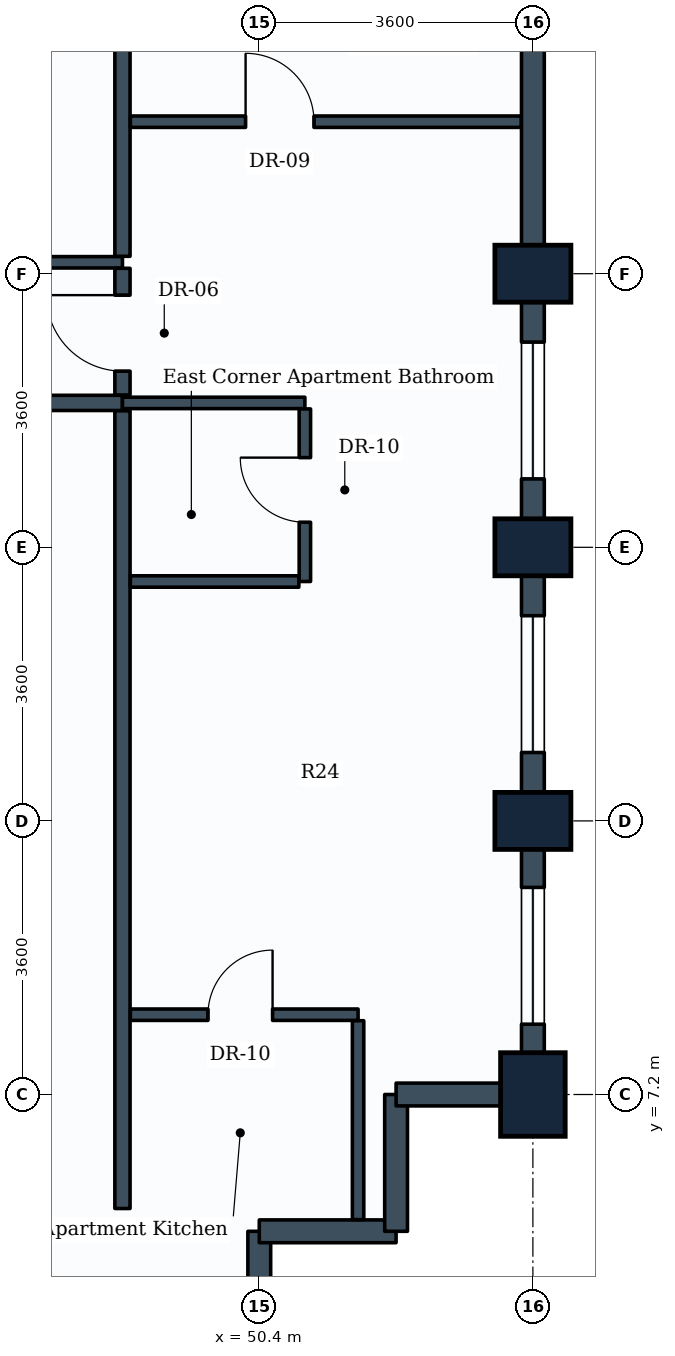
"""IFC4 building model, lengths in metres.
Left out: names, types, materials, properties, quantities, classifications, styles, units other than length and angle.
Written with IfcOpenShell. Run it as: python <this file> out.ifc"""

import sys

from ifc_helpers import new_model, si_unit, direction, frame, frame_2d, origin, origin_2d, place, context, subcontext, project, spatial, rectangle, extrude, element, fill, save


model = new_model("IFC4")
c1 = context("Model", 3, precision=1e-05, world=origin(), true_north=direction((0.0, 1.0)))
c2 = subcontext(c1, "Body", "Model", "MODEL_VIEW")
j1 = project(units=[si_unit("LENGTHUNIT", "METRE"), si_unit("PLANEANGLEUNIT", "RADIAN")], contexts=[c1])
p1 = place(None, origin())
s1 = spatial("IfcSite", under=j1, at=p1, CompositionType="ELEMENT")
p2 = place(p1, origin())
s2 = spatial("IfcBuilding", under=s1, at=p2, CompositionType="ELEMENT")
p3 = place(p2, frame((0.0, 0.0, 135.2)))
s3 = spatial("IfcBuildingStorey", under=s2, at=p3, CompositionType="ELEMENT", Elevation=135.2)
p4 = place(p3, frame((54.0, 7.2, 0.0), z_axis=(0.0, 0.0, 1.0), x_axis=(1.0, 0.0, 0.0)))
e1 = element("IfcColumn", 1, at=p4, inside=s3, PredefinedType="COLUMN", context=c2, shape_type="SweptSolid", body=[
    extrude(rectangle(XDim=0.85, YDim=1.1, at=origin_2d()), origin(), (0.0, 0.0, 1.0), 3.8),
])
for number, where, z_axis, x_axis in (
    (2, (54.0, 10.8, 0.0), (0.0, 0.0, 1.0), (0.0, 1.0, 0.0)),
    (3, (54.0, 14.4, 0.0), (0.0, 0.0, 1.0), (0.0, 1.0, 0.0)),
    (4, (54.0, 18.0, 0.0), (0.0, 0.0, 1.0), (0.0, 1.0, 0.0)),
):
    element("IfcColumn", number, at=place(p3, frame(where, z_axis=z_axis, x_axis=x_axis)), inside=s3, PredefinedType="COLUMN", context=c2, shape_type="SweptSolid", body=[
        extrude(rectangle(XDim=0.75, YDim=1.0, at=origin_2d()), origin(), (0.0, 0.0, 1.0), 3.8),
    ])
p5 = place(p3, frame((50.4, 5.4, 0.0), z_axis=(0.0, 0.0, 1.0), x_axis=(0.0, -1.0, 0.0)))
e5 = element("IfcWall", 5, at=p5, inside=s3, PredefinedType="STANDARD", context=c2, shape_type="SweptSolid", body=[
    extrude(rectangle(XDim=1.8, YDim=0.3, at=frame_2d((0.9, 0.0))), origin(), (0.0, 0.0, 1.0), 2.93),
])
for number, where, z_axis, x_axis in (
    (6, (52.2, 5.4, 0.0), (0.0, 0.0, 1.0), (-1.0, 0.0, 0.0)),
    (7, (52.2, 7.2, 0.0), (0.0, 0.0, 1.0), (0.0, -1.0, 0.0)),
):
    element("IfcWall", number, at=place(p3, frame(where, z_axis=z_axis, x_axis=x_axis)), inside=s3, PredefinedType="STANDARD", context=c2, shape_type="SweptSolid", body=[
        extrude(rectangle(XDim=1.8, YDim=0.3, at=frame_2d((0.9, 0.0))), origin(), (0.0, 0.0, 1.0), 3.535),
    ])
p6 = place(p3, frame((54.0, 7.2, 0.0), z_axis=(0.0, 0.0, 1.0), x_axis=(-1.0, 0.0, 0.0)))
e8 = element("IfcWall", 8, at=p6, inside=s3, PredefinedType="STANDARD", context=c2, shape_type="SweptSolid", body=[
    extrude(rectangle(XDim=1.8, YDim=0.3, at=frame_2d((0.9, 0.0))), origin(), (0.0, 0.0, 1.0), 2.93),
])
p7 = place(p3, frame((54.0, 10.8, 0.0), z_axis=(0.0, 0.0, 1.0), x_axis=(0.0, -1.0, 0.0)))
e9 = element("IfcWall", 9, at=p7, inside=s3, PredefinedType="STANDARD", context=c2, shape_type="SweptSolid", body=[
    extrude(rectangle(XDim=3.6, YDim=0.3, at=frame_2d((1.8, 0.0))), origin(), (0.0, 0.0, 1.0), 2.93),
])
p8 = place(p7, frame((0.875, 0.0, 0.85)))
e10 = element("IfcOpeningElement", 10, at=p8, cuts=e9, PredefinedType="OPENING", context=c2, shape_type="SweptSolid", body=[
    extrude(rectangle(XDim=1.8, YDim=1.35, at=frame_2d((0.9, 0.675))), frame((0.0, 0.16, 0.0), z_axis=(0.0, -1.0, 0.0), x_axis=(1.0, 0.0, 0.0)), (0.0, 0.0, 1.0), 0.32),
])
p9 = place(p3, frame((54.0, 14.4, 0.0), z_axis=(0.0, 0.0, 1.0), x_axis=(0.0, -1.0, 0.0)))
e11 = element("IfcWall", 11, at=p9, inside=s3, PredefinedType="STANDARD", context=c2, shape_type="SweptSolid", body=[
    extrude(rectangle(XDim=3.6, YDim=0.3, at=frame_2d((1.8, 0.0))), origin(), (0.0, 0.0, 1.0), 2.93),
])
p10 = place(p9, frame((0.9, 0.0, 0.85)))
e12 = element("IfcOpeningElement", 12, at=p10, cuts=e11, PredefinedType="OPENING", context=c2, shape_type="SweptSolid", body=[
    extrude(rectangle(XDim=1.8, YDim=1.35, at=frame_2d((0.9, 0.675))), frame((0.0, 0.16, 0.0), z_axis=(0.0, -1.0, 0.0), x_axis=(1.0, 0.0, 0.0)), (0.0, 0.0, 1.0), 0.32),
])
p11 = place(p3, frame((54.0, 18.0, 0.0), z_axis=(0.0, 0.0, 1.0), x_axis=(0.0, -1.0, 0.0)))
e13 = element("IfcWall", 13, at=p11, inside=s3, PredefinedType="STANDARD", context=c2, shape_type="SweptSolid", body=[
    extrude(rectangle(XDim=3.6, YDim=0.3, at=frame_2d((1.8, 0.0))), origin(), (0.0, 0.0, 1.0), 2.93),
])
p12 = place(p11, frame((0.9, 0.0, 0.85)))
e14 = element("IfcOpeningElement", 14, at=p12, cuts=e13, PredefinedType="OPENING", context=c2, shape_type="SweptSolid", body=[
    extrude(rectangle(XDim=1.8, YDim=1.35, at=frame_2d((0.9, 0.675))), frame((0.0, 0.16, 0.0), z_axis=(0.0, -1.0, 0.0), x_axis=(1.0, 0.0, 0.0)), (0.0, 0.0, 1.0), 0.32),
])
p13 = place(p3, frame((54.0, 21.6, 0.0), z_axis=(0.0, 0.0, 1.0), x_axis=(0.0, -1.0, 0.0)))
e15 = element("IfcWall", 15, at=p13, inside=s3, PredefinedType="STANDARD", context=c2, shape_type="SweptSolid", body=[
    extrude(rectangle(XDim=3.6, YDim=0.3, at=frame_2d((1.8, 0.0))), origin(), (0.0, 0.0, 1.0), 2.93),
])
p14 = place(p3, frame((45.68, 16.3, 0.0), z_axis=(0.0, 0.0, 1.0), x_axis=(1.0, 0.0, 0.0)))
e16 = element("IfcWall", 16, at=p14, inside=s3, PredefinedType="PARTITIONING", context=c2, shape_type="SweptSolid", body=[
    extrude(rectangle(XDim=2.92, YDim=0.2, at=frame_2d((1.46, 0.0))), origin(), (0.0, 0.0, 1.0), 3.17),
])
p15 = place(p3, frame((43.904, 18.15, 0.0), z_axis=(0.0, 0.0, 1.0), x_axis=(1.0, 0.0, 0.0)))
e17 = element("IfcWall", 17, at=p15, inside=s3, PredefinedType="PARTITIONING", context=c2, shape_type="SweptSolid", body=[
    extrude(rectangle(XDim=4.696, YDim=0.15, at=frame_2d((2.348, 0.0))), origin(), (0.0, 0.0, 1.0), 3.17),
])
p16 = place(p15, frame((1.757, 0.0, 0.0)))
e18 = element("IfcOpeningElement", 18, at=p16, cuts=e17, PredefinedType="OPENING", context=c2, shape_type="SweptSolid", body=[
    extrude(rectangle(XDim=1.0, YDim=2.1, at=frame_2d((0.5, 1.05))), frame((0.0, 0.085, 0.0), z_axis=(0.0, -1.0, 0.0), x_axis=(1.0, 0.0, 0.0)), (0.0, 0.0, 1.0), 0.17),
])
p17 = place(p3, frame((48.6, 5.7, 0.0), z_axis=(0.0, 0.0, 1.0), x_axis=(0.0, 1.0, 0.0)))
e19 = element("IfcWall", 19, at=p17, inside=s3, PredefinedType="PARTITIONING", context=c2, shape_type="SweptSolid", body=[
    extrude(rectangle(XDim=10.496, YDim=0.2, at=frame_2d((5.248, 0.0))), origin(), (0.0, 0.0, 1.0), 3.17),
])
p18 = place(p3, frame((48.6, 18.229, 0.0), z_axis=(0.0, 0.0, 1.0), x_axis=(0.0, 1.0, 0.0)))
e20 = element("IfcWall", 20, at=p18, inside=s3, PredefinedType="PARTITIONING", context=c2, shape_type="SweptSolid", body=[
    extrude(rectangle(XDim=6.817, YDim=0.2, at=frame_2d((3.408, 0.0))), origin(), (0.0, 0.0, 1.0), 2.93),
])
p19 = place(p3, frame((48.6, 16.404, 0.0), z_axis=(0.0, 0.0, 1.0), x_axis=(0.0, 1.0, 0.0)))
e21 = element("IfcWall", 21, at=p19, inside=s3, PredefinedType="PARTITIONING", context=c2, shape_type="SweptSolid", body=[
    extrude(rectangle(XDim=1.667, YDim=0.2, at=frame_2d((0.833, 0.0))), origin(), (0.0, 0.0, 1.0), 3.535),
])
p20 = place(p19, frame((0.314, 0.0, 0.0)))
e22 = element("IfcOpeningElement", 22, at=p20, cuts=e21, PredefinedType="OPENING", context=c2, shape_type="SweptSolid", body=[
    extrude(rectangle(XDim=1.0, YDim=2.1, at=frame_2d((0.5, 1.05))), frame((0.0, 0.11, 0.0), z_axis=(0.0, -1.0, 0.0), x_axis=(1.0, 0.0, 0.0)), (0.0, 0.0, 1.0), 0.22),
])
p21 = place(p3, frame((48.6, 16.3, 0.0), z_axis=(0.0, 0.0, 1.0), x_axis=(1.0, 0.0, 0.0)))
e23 = element("IfcWall", 23, at=p21, inside=s3, PredefinedType="PARTITIONING", context=c2, shape_type="SweptSolid", body=[
    extrude(rectangle(XDim=2.4, YDim=0.15, at=frame_2d((1.2, 0.0))), origin(), (0.0, 0.0, 1.0), 3.535),
])
p22 = place(p3, frame((51.0, 13.95, 0.0), z_axis=(0.0, 0.0, 1.0), x_axis=(0.0, 1.0, 0.0)))
e24 = element("IfcWall", 24, at=p22, inside=s3, PredefinedType="PARTITIONING", context=c2, shape_type="SweptSolid", body=[
    extrude(rectangle(XDim=2.271, YDim=0.15, at=frame_2d((1.135, 0.0))), origin(), (0.0, 0.0, 1.0), 3.17),
])
p23 = place(p22, frame((0.78, 0.0, 0.0)))
e25 = element("IfcOpeningElement", 25, at=p23, cuts=e24, PredefinedType="OPENING", context=c2, shape_type="SweptSolid", body=[
    extrude(rectangle(XDim=0.85, YDim=2.1, at=frame_2d((0.425, 1.05))), frame((0.0, 0.085, 0.0), z_axis=(0.0, -1.0, 0.0), x_axis=(1.0, 0.0, 0.0)), (0.0, 0.0, 1.0), 0.17),
])
p24 = place(p3, frame((48.704, 13.95, 0.0), z_axis=(0.0, 0.0, 1.0), x_axis=(1.0, 0.0, 0.0)))
e26 = element("IfcWall", 26, at=p24, inside=s3, PredefinedType="PARTITIONING", context=c2, shape_type="SweptSolid", body=[
    extrude(rectangle(XDim=2.217, YDim=0.15, at=frame_2d((1.108, 0.0))), origin(), (0.0, 0.0, 1.0), 3.535),
])
p25 = place(p3, frame((48.704, 20.0, 0.0), z_axis=(0.0, 0.0, 1.0), x_axis=(1.0, 0.0, 0.0)))
e27 = element("IfcWall", 27, at=p25, inside=s3, PredefinedType="PARTITIONING", context=c2, shape_type="SweptSolid", body=[
    extrude(rectangle(XDim=5.142, YDim=0.15, at=frame_2d((2.571, 0.0))), origin(), (0.0, 0.0, 1.0), 2.93),
])
p26 = place(p25, frame((1.516, 0.0, 0.0)))
e28 = element("IfcOpeningElement", 28, at=p26, cuts=e27, PredefinedType="OPENING", context=c2, shape_type="SweptSolid", body=[
    extrude(rectangle(XDim=0.9, YDim=2.1, at=frame_2d((0.45, 1.05))), frame((0.0, 0.085, 0.0), z_axis=(0.0, -1.0, 0.0), x_axis=(1.0, 0.0, 0.0)), (0.0, 0.0, 1.0), 0.17),
])
p27 = place(p3, frame((48.704, 8.25, 0.0), z_axis=(0.0, 0.0, 1.0), x_axis=(1.0, 0.0, 0.0)))
e29 = element("IfcWall", 29, at=p27, inside=s3, PredefinedType="PARTITIONING", context=c2, shape_type="SweptSolid", body=[
    extrude(rectangle(XDim=2.996, YDim=0.15, at=frame_2d((1.498, 0.0))), origin(), (0.0, 0.0, 1.0), 3.535),
])
p28 = place(p27, frame((1.021, 0.0, 0.0)))
e30 = element("IfcOpeningElement", 30, at=p28, cuts=e29, PredefinedType="OPENING", context=c2, shape_type="SweptSolid", body=[
    extrude(rectangle(XDim=0.85, YDim=2.1, at=frame_2d((0.425, 1.05))), frame((0.0, 0.085, 0.0), z_axis=(0.0, -1.0, 0.0), x_axis=(1.0, 0.0, 0.0)), (0.0, 0.0, 1.0), 0.17),
])
p29 = place(p3, frame((51.7, 5.554, 0.0), z_axis=(0.0, 0.0, 1.0), x_axis=(0.0, 1.0, 0.0)))
e31 = element("IfcWall", 31, at=p29, inside=s3, PredefinedType="PARTITIONING", context=c2, shape_type="SweptSolid", body=[
    extrude(rectangle(XDim=2.617, YDim=0.15, at=frame_2d((1.309, 0.0))), origin(), (0.0, 0.0, 1.0), 3.535),
])
p30 = place(p8, origin())
e32 = element("IfcWindow", 32, at=p30, inside=s3, PartitioningType="SINGLE_PANEL", PredefinedType="WINDOW", context=c2, shape_type="SweptSolid", body=[
    extrude(rectangle(XDim=1.8, YDim=1.35, at=frame_2d((0.9, 0.675))), frame((0.0, 0.03, 0.0), z_axis=(0.0, -1.0, 0.0), x_axis=(1.0, 0.0, 0.0)), (0.0, 0.0, 1.0), 0.06),
])
fill(e10, e32)
p31 = place(p10, origin())
e33 = element("IfcWindow", 33, at=p31, inside=s3, PartitioningType="SINGLE_PANEL", PredefinedType="WINDOW", context=c2, shape_type="SweptSolid", body=[
    extrude(rectangle(XDim=1.8, YDim=1.35, at=frame_2d((0.9, 0.675))), frame((0.0, 0.03, 0.0), z_axis=(0.0, -1.0, 0.0), x_axis=(1.0, 0.0, 0.0)), (0.0, 0.0, 1.0), 0.06),
])
fill(e12, e33)
p32 = place(p12, origin())
e34 = element("IfcWindow", 34, at=p32, inside=s3, PartitioningType="SINGLE_PANEL", PredefinedType="WINDOW", context=c2, shape_type="SweptSolid", body=[
    extrude(rectangle(XDim=1.8, YDim=1.35, at=frame_2d((0.9, 0.675))), frame((0.0, 0.03, 0.0), z_axis=(0.0, -1.0, 0.0), x_axis=(1.0, 0.0, 0.0)), (0.0, 0.0, 1.0), 0.06),
])
fill(e14, e34)
p33 = place(p20, origin())
e35 = element("IfcDoor", 35, at=p33, inside=s3, OperationType="SINGLE_SWING_RIGHT", PredefinedType="DOOR", context=c2, shape_type="SweptSolid", body=[
    extrude(rectangle(XDim=1.0, YDim=2.1, at=frame_2d((0.5, 1.05))), frame((0.0, 0.025, 0.0), z_axis=(0.0, -1.0, 0.0), x_axis=(1.0, 0.0, 0.0)), (0.0, 0.0, 1.0), 0.05),
])
fill(e22, e35)
p34 = place(p23, origin())
e36 = element("IfcDoor", 36, at=p34, inside=s3, OperationType="SINGLE_SWING_RIGHT", PredefinedType="DOOR", context=c2, shape_type="SweptSolid", body=[
    extrude(rectangle(XDim=0.85, YDim=2.1, at=frame_2d((0.425, 1.05))), frame((0.0, 0.025, 0.0), z_axis=(0.0, -1.0, 0.0), x_axis=(1.0, 0.0, 0.0)), (0.0, 0.0, 1.0), 0.05),
])
fill(e25, e36)
p35 = place(p26, origin())
e37 = element("IfcDoor", 37, at=p35, inside=s3, OperationType="SINGLE_SWING_LEFT", PredefinedType="DOOR", context=c2, shape_type="SweptSolid", body=[
    extrude(rectangle(XDim=0.9, YDim=2.1, at=frame_2d((0.45, 1.05))), frame((0.0, 0.025, 0.0), z_axis=(0.0, -1.0, 0.0), x_axis=(1.0, 0.0, 0.0)), (0.0, 0.0, 1.0), 0.05),
])
fill(e28, e37)
p36 = place(p28, origin())
e38 = element("IfcDoor", 38, at=p36, inside=s3, OperationType="SINGLE_SWING_RIGHT", PredefinedType="DOOR", context=c2, shape_type="SweptSolid", body=[
    extrude(rectangle(XDim=0.85, YDim=2.1, at=frame_2d((0.425, 1.05))), frame((0.0, 0.025, 0.0), z_axis=(0.0, -1.0, 0.0), x_axis=(1.0, 0.0, 0.0)), (0.0, 0.0, 1.0), 0.05),
])
fill(e30, e38)
save(model, sys.argv[1])
